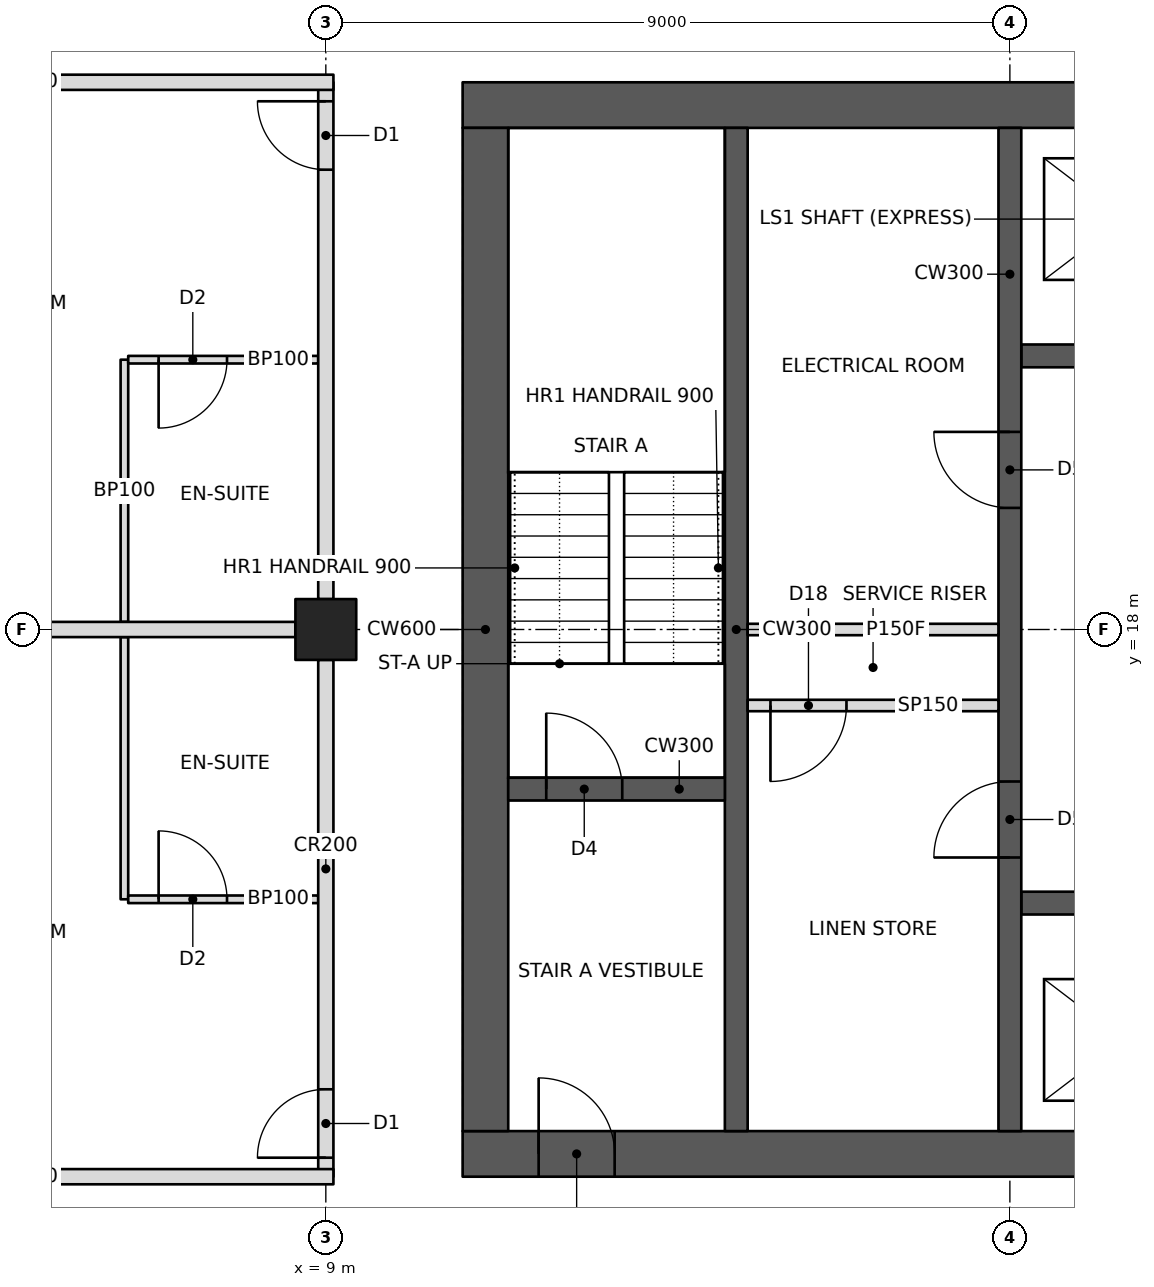
"""IFC4 building model, lengths in metres.
Left out: names, types, materials, properties, quantities, classifications, styles, units other than length and angle.
Written with IfcOpenShell. Run it as: python <this file> out.ifc"""

import sys

from ifc_helpers import new_model, si_unit, direction, frame, frame_2d, origin, origin_2d, place, context, subcontext, project, spatial, rectangle, hollow_rectangle, extrude, element, fill, save


model = new_model("IFC4")
c1 = context("Model", 3, precision=1e-05, world=origin(), true_north=direction((0.0, 1.0)))
c2 = subcontext(c1, "Body", "Model", "MODEL_VIEW")
j1 = project(units=[si_unit("LENGTHUNIT", "METRE"), si_unit("PLANEANGLEUNIT", "RADIAN")], contexts=[c1])
p1 = place(None, origin())
s1 = spatial("IfcSite", under=j1, at=p1, CompositionType="ELEMENT")
p2 = place(p1, origin())
s2 = spatial("IfcBuilding", under=s1, at=p2, CompositionType="ELEMENT")
p3 = place(p2, frame((0.0, 0.0, 28.0)))
s3 = spatial("IfcBuildingStorey", under=s2, at=p3, CompositionType="ELEMENT", Elevation=28.0)
p4 = place(p3, frame((9.0, 18.0, 0.0), z_axis=(0.0, 0.0, 1.0), x_axis=(1.0, 0.0, 0.0)))
e1 = element("IfcColumn", 1, at=p4, inside=s3, PredefinedType="COLUMN", context=c2, shape_type="SweptSolid", body=[
    extrude(hollow_rectangle(XDim=0.8, YDim=0.8, WallThickness=0.1, at=origin_2d()), origin(), (0.0, 0.0, 1.0), 3.4),
])
p5 = place(p3, frame((10.8, 11.1, 0.0), z_axis=(0.0, 0.0, 1.0), x_axis=(1.0, 0.0, 0.0)))
e2 = element("IfcWall", 2, at=p5, inside=s3, PredefinedType="SHEAR", context=c2, shape_type="SweptSolid", body=[
    extrude(rectangle(XDim=23.4, YDim=0.6, at=frame_2d((11.7, 0.0))), origin(), (0.0, 0.0, 1.0), 3.4),
])
p6 = place(p5, frame((1.0, 0.0, 0.0)))
e3 = element("IfcOpeningElement", 3, at=p6, cuts=e2, PredefinedType="OPENING", context=c2, shape_type="SweptSolid", body=[
    extrude(rectangle(XDim=1.0, YDim=2.1, at=frame_2d((0.5, 1.05))), frame((0.0, 0.31, 0.0), z_axis=(0.0, -1.0, 0.0), x_axis=(1.0, 0.0, 0.0)), (0.0, 0.0, 1.0), 0.62),
])
p7 = place(p5, frame((17.2, 0.0, 0.0)))
e4 = element("IfcOpeningElement", 4, at=p7, cuts=e2, PredefinedType="OPENING", context=c2, shape_type="SweptSolid", body=[
    extrude(rectangle(XDim=1.8, YDim=2.1, at=frame_2d((0.9, 1.05))), frame((0.0, 0.31, 0.0), z_axis=(0.0, -1.0, 0.0), x_axis=(1.0, 0.0, 0.0)), (0.0, 0.0, 1.0), 0.62),
])
p8 = place(p3, frame((10.8, 24.9, 0.0), z_axis=(0.0, 0.0, 1.0), x_axis=(1.0, 0.0, 0.0)))
e5 = element("IfcWall", 5, at=p8, inside=s3, PredefinedType="SHEAR", context=c2, shape_type="SweptSolid", body=[
    extrude(rectangle(XDim=23.4, YDim=0.6, at=frame_2d((11.7, 0.0))), origin(), (0.0, 0.0, 1.0), 3.4),
])
p9 = place(p8, frame((17.2, 0.0, 0.0)))
e6 = element("IfcOpeningElement", 6, at=p9, cuts=e5, PredefinedType="OPENING", context=c2, shape_type="SweptSolid", body=[
    extrude(rectangle(XDim=1.8, YDim=2.1, at=frame_2d((0.9, 1.05))), frame((0.0, 0.31, 0.0), z_axis=(0.0, -1.0, 0.0), x_axis=(1.0, 0.0, 0.0)), (0.0, 0.0, 1.0), 0.62),
])
p10 = place(p8, frame((21.1, 0.0, 0.0)))
e7 = element("IfcOpeningElement", 7, at=p10, cuts=e5, PredefinedType="OPENING", context=c2, shape_type="SweptSolid", body=[
    extrude(rectangle(XDim=1.0, YDim=2.1, at=frame_2d((0.5, 1.05))), frame((0.0, 0.31, 0.0), z_axis=(0.0, -1.0, 0.0), x_axis=(1.0, 0.0, 0.0)), (0.0, 0.0, 1.0), 0.62),
])
p11 = place(p3, frame((11.1, 11.4, 0.0), z_axis=(0.0, 0.0, 1.0), x_axis=(0.0, 1.0, 0.0)))
e8 = element("IfcWall", 8, at=p11, inside=s3, PredefinedType="SHEAR", context=c2, shape_type="SweptSolid", body=[
    extrude(rectangle(XDim=13.2, YDim=0.6, at=frame_2d((6.6, 0.0))), origin(), (0.0, 0.0, 1.0), 3.4),
])
p12 = place(p3, frame((14.4, 11.4, 0.0), z_axis=(0.0, 0.0, 1.0), x_axis=(0.0, 1.0, 0.0)))
e9 = element("IfcWall", 9, at=p12, inside=s3, PredefinedType="SHEAR", context=c2, shape_type="SweptSolid", body=[
    extrude(rectangle(XDim=13.2, YDim=0.3, at=frame_2d((6.6, 0.0))), origin(), (0.0, 0.0, 1.0), 3.4),
])
p13 = place(p3, frame((11.4, 15.9, 0.0), z_axis=(0.0, 0.0, 1.0), x_axis=(1.0, 0.0, 0.0)))
e10 = element("IfcWall", 10, at=p13, inside=s3, PredefinedType="SHEAR", context=c2, shape_type="SweptSolid", body=[
    extrude(rectangle(XDim=2.85, YDim=0.3, at=frame_2d((1.425, 0.0))), origin(), (0.0, 0.0, 1.0), 3.4),
])
p14 = place(p13, frame((0.5, 0.0, 0.0)))
e11 = element("IfcOpeningElement", 11, at=p14, cuts=e10, PredefinedType="OPENING", context=c2, shape_type="SweptSolid", body=[
    extrude(rectangle(XDim=1.0, YDim=2.1, at=frame_2d((0.5, 1.05))), frame((0.0, 0.16, 0.0), z_axis=(0.0, -1.0, 0.0), x_axis=(1.0, 0.0, 0.0)), (0.0, 0.0, 1.0), 0.32),
])
p15 = place(p3, frame((18.0, 11.4, 0.0), z_axis=(0.0, 0.0, 1.0), x_axis=(0.0, 1.0, 0.0)))
e12 = element("IfcWall", 12, at=p15, inside=s3, PredefinedType="SHEAR", context=c2, shape_type="SweptSolid", body=[
    extrude(rectangle(XDim=13.2, YDim=0.3, at=frame_2d((6.6, 0.0))), origin(), (0.0, 0.0, 1.0), 3.4),
])
p16 = place(p15, frame((3.6, 0.0, 0.0)))
e13 = element("IfcOpeningElement", 13, at=p16, cuts=e12, PredefinedType="OPENING", context=c2, shape_type="SweptSolid", body=[
    extrude(rectangle(XDim=1.0, YDim=2.1, at=frame_2d((0.5, 1.05))), frame((0.0, 0.16, 0.0), z_axis=(0.0, -1.0, 0.0), x_axis=(1.0, 0.0, 0.0)), (0.0, 0.0, 1.0), 0.32),
])
p17 = place(p15, frame((8.2, 0.0, 0.0)))
e14 = element("IfcOpeningElement", 14, at=p17, cuts=e12, PredefinedType="OPENING", context=c2, shape_type="SweptSolid", body=[
    extrude(rectangle(XDim=1.0, YDim=2.1, at=frame_2d((0.5, 1.05))), frame((0.0, 0.16, 0.0), z_axis=(0.0, -1.0, 0.0), x_axis=(1.0, 0.0, 0.0)), (0.0, 0.0, 1.0), 0.32),
])
p18 = place(p3, frame((14.55, 18.0, 0.0), z_axis=(0.0, 0.0, 1.0), x_axis=(1.0, 0.0, 0.0)))
e15 = element("IfcWall", 15, at=p18, inside=s3, PredefinedType="PARTITIONING", context=c2, shape_type="SweptSolid", body=[
    extrude(rectangle(XDim=3.3, YDim=0.15, at=frame_2d((1.65, 0.0))), origin(), (0.0, 0.0, 1.0), 3.2),
])
p19 = place(p3, frame((18.15, 14.4, 0.0), z_axis=(0.0, 0.0, 1.0), x_axis=(1.0, 0.0, 0.0)))
e16 = element("IfcWall", 16, at=p19, inside=s3, PredefinedType="SHEAR", context=c2, shape_type="SweptSolid", body=[
    extrude(rectangle(XDim=9.0, YDim=0.3, at=frame_2d((4.5, 0.0))), origin(), (0.0, 0.0, 1.0), 3.4),
])
p20 = place(p19, frame((0.8, 0.0, 0.0)))
e17 = element("IfcOpeningElement", 17, at=p20, cuts=e16, PredefinedType="OPENING", context=c2, shape_type="SweptSolid", body=[
    extrude(rectangle(XDim=1.1, YDim=2.1, at=frame_2d((0.55, 1.05))), frame((0.0, 0.16, 0.0), z_axis=(0.0, -1.0, 0.0), x_axis=(1.0, 0.0, 0.0)), (0.0, 0.0, 1.0), 0.32),
])
p21 = place(p19, frame((3.8, 0.0, 0.0)))
e18 = element("IfcOpeningElement", 18, at=p21, cuts=e16, PredefinedType="OPENING", context=c2, shape_type="SweptSolid", body=[
    extrude(rectangle(XDim=1.1, YDim=2.1, at=frame_2d((0.55, 1.05))), frame((0.0, 0.16, 0.0), z_axis=(0.0, -1.0, 0.0), x_axis=(1.0, 0.0, 0.0)), (0.0, 0.0, 1.0), 0.32),
])
p22 = place(p19, frame((6.75, 0.0, 0.0)))
e19 = element("IfcOpeningElement", 19, at=p22, cuts=e16, PredefinedType="OPENING", context=c2, shape_type="SweptSolid", body=[
    extrude(rectangle(XDim=1.2, YDim=2.1, at=frame_2d((0.6, 1.05))), frame((0.0, 0.16, 0.0), z_axis=(0.0, -1.0, 0.0), x_axis=(1.0, 0.0, 0.0)), (0.0, 0.0, 1.0), 0.32),
])
p23 = place(p3, frame((18.15, 21.6, 0.0), z_axis=(0.0, 0.0, 1.0), x_axis=(1.0, 0.0, 0.0)))
e20 = element("IfcWall", 20, at=p23, inside=s3, PredefinedType="SHEAR", context=c2, shape_type="SweptSolid", body=[
    extrude(rectangle(XDim=9.0, YDim=0.3, at=frame_2d((4.5, 0.0))), origin(), (0.0, 0.0, 1.0), 3.4),
])
p24 = place(p23, frame((6.75, 0.0, 0.0)))
e21 = element("IfcOpeningElement", 21, at=p24, cuts=e20, PredefinedType="OPENING", context=c2, shape_type="SweptSolid", body=[
    extrude(rectangle(XDim=1.2, YDim=2.1, at=frame_2d((0.6, 1.05))), frame((0.0, 0.16, 0.0), z_axis=(0.0, -1.0, 0.0), x_axis=(1.0, 0.0, 0.0)), (0.0, 0.0, 1.0), 0.32),
])
p25 = place(p3, frame((9.0, 10.8, 0.0), z_axis=(0.0, 0.0, 1.0), x_axis=(0.0, 1.0, 0.0)))
e22 = element("IfcWall", 22, at=p25, inside=s3, PredefinedType="PARTITIONING", context=c2, shape_type="SweptSolid", body=[
    extrude(rectangle(XDim=6.8, YDim=0.2, at=frame_2d((3.4, 0.0))), origin(), (0.0, 0.0, 1.0), 2.405),
])
p26 = place(p25, frame((0.25, 0.0, 0.0)))
e23 = element("IfcOpeningElement", 23, at=p26, cuts=e22, PredefinedType="OPENING", context=c2, shape_type="SweptSolid", body=[
    extrude(rectangle(XDim=0.9, YDim=2.1, at=frame_2d((0.45, 1.05))), frame((0.0, 0.11, 0.0), z_axis=(0.0, -1.0, 0.0), x_axis=(1.0, 0.0, 0.0)), (0.0, 0.0, 1.0), 0.22),
])
p27 = place(p3, frame((9.0, 18.4, 0.0), z_axis=(0.0, 0.0, 1.0), x_axis=(0.0, 1.0, 0.0)))
e24 = element("IfcWall", 24, at=p27, inside=s3, PredefinedType="PARTITIONING", context=c2, shape_type="SweptSolid", body=[
    extrude(rectangle(XDim=6.8, YDim=0.2, at=frame_2d((3.4, 0.0))), origin(), (0.0, 0.0, 1.0), 2.405),
])
p28 = place(p27, frame((5.65, 0.0, 0.0)))
e25 = element("IfcOpeningElement", 25, at=p28, cuts=e24, PredefinedType="OPENING", context=c2, shape_type="SweptSolid", body=[
    extrude(rectangle(XDim=0.9, YDim=2.1, at=frame_2d((0.45, 1.05))), frame((0.0, 0.11, 0.0), z_axis=(0.0, -1.0, 0.0), x_axis=(1.0, 0.0, 0.0)), (0.0, 0.0, 1.0), 0.22),
])
for number, where, z_axis, x_axis in (
    (26, (1.0, 10.8, 0.0), (0.0, 0.0, 1.0), (1.0, 0.0, 0.0)),
    (27, (1.0, 25.2, 0.0), (0.0, 0.0, 1.0), (1.0, 0.0, 0.0)),
):
    element("IfcWall", number, at=place(p3, frame(where, z_axis=z_axis, x_axis=x_axis)), inside=s3, PredefinedType="PARTITIONING", context=c2, shape_type="SweptSolid", body=[
        extrude(rectangle(XDim=8.1, YDim=0.2, at=frame_2d((4.05, 0.0))), origin(), (0.0, 0.0, 1.0), 2.404),
    ])
p29 = place(p3, frame((8.6, 18.0, 0.0), z_axis=(0.0, 0.0, 1.0), x_axis=(-1.0, 0.0, 0.0)))
e28 = element("IfcWall", 28, at=p29, inside=s3, PredefinedType="PARTITIONING", context=c2, shape_type="SweptSolid", body=[
    extrude(rectangle(XDim=7.6, YDim=0.2, at=frame_2d((3.8, 0.0))), origin(), (0.0, 0.0, 1.0), 2.405),
])
p30 = place(p3, frame((6.35, 14.45, 0.0), z_axis=(0.0, 0.0, 1.0), x_axis=(0.0, 1.0, 0.0)))
e29 = element("IfcWall", 29, at=p30, inside=s3, PredefinedType="PARTITIONING", context=c2, shape_type="SweptSolid", body=[
    extrude(rectangle(XDim=3.45, YDim=0.1, at=frame_2d((1.725, 0.0))), origin(), (0.0, 0.0, 1.0), 2.404),
])
p31 = place(p3, frame((8.9, 14.45, 0.0), z_axis=(0.0, 0.0, 1.0), x_axis=(-1.0, 0.0, 0.0)))
e30 = element("IfcWall", 30, at=p31, inside=s3, PredefinedType="PARTITIONING", context=c2, shape_type="SweptSolid", body=[
    extrude(rectangle(XDim=2.5, YDim=0.1, at=frame_2d((1.25, 0.0))), origin(), (0.0, 0.0, 1.0), 2.404),
])
p32 = place(p31, frame((1.2, 0.0, 0.0)))
e31 = element("IfcOpeningElement", 31, at=p32, cuts=e30, PredefinedType="OPENING", context=c2, shape_type="SweptSolid", body=[
    extrude(rectangle(XDim=0.9, YDim=2.1, at=frame_2d((0.45, 1.05))), frame((0.0, 0.06, 0.0), z_axis=(0.0, -1.0, 0.0), x_axis=(1.0, 0.0, 0.0)), (0.0, 0.0, 1.0), 0.12),
])
p33 = place(p3, frame((6.35, 18.1, 0.0), z_axis=(0.0, 0.0, 1.0), x_axis=(0.0, 1.0, 0.0)))
e32 = element("IfcWall", 32, at=p33, inside=s3, PredefinedType="PARTITIONING", context=c2, shape_type="SweptSolid", body=[
    extrude(rectangle(XDim=3.45, YDim=0.1, at=frame_2d((1.725, 0.0))), origin(), (0.0, 0.0, 1.0), 2.404),
])
p34 = place(p3, frame((8.9, 21.55, 0.0), z_axis=(0.0, 0.0, 1.0), x_axis=(-1.0, 0.0, 0.0)))
e33 = element("IfcWall", 33, at=p34, inside=s3, PredefinedType="PARTITIONING", context=c2, shape_type="SweptSolid", body=[
    extrude(rectangle(XDim=2.5, YDim=0.1, at=frame_2d((1.25, 0.0))), origin(), (0.0, 0.0, 1.0), 2.404),
])
p35 = place(p34, frame((1.2, 0.0, 0.0)))
e34 = element("IfcOpeningElement", 34, at=p35, cuts=e33, PredefinedType="OPENING", context=c2, shape_type="SweptSolid", body=[
    extrude(rectangle(XDim=0.9, YDim=2.1, at=frame_2d((0.45, 1.05))), frame((0.0, 0.06, 0.0), z_axis=(0.0, -1.0, 0.0), x_axis=(1.0, 0.0, 0.0)), (0.0, 0.0, 1.0), 0.12),
])
p36 = place(p3, frame((14.55, 17.0, 0.0), z_axis=(0.0, 0.0, 1.0), x_axis=(1.0, 0.0, 0.0)))
e35 = element("IfcWall", 35, at=p36, inside=s3, PredefinedType="PARTITIONING", context=c2, shape_type="SweptSolid", body=[
    extrude(rectangle(XDim=3.3, YDim=0.15, at=frame_2d((1.65, 0.0))), origin(), (0.0, 0.0, 1.0), 3.2),
])
p37 = place(p36, frame((0.3, 0.0, 0.0)))
e36 = element("IfcOpeningElement", 36, at=p37, cuts=e35, PredefinedType="OPENING", context=c2, shape_type="SweptSolid", body=[
    extrude(rectangle(XDim=1.0, YDim=2.1, at=frame_2d((0.5, 1.05))), frame((0.0, 0.085, 0.0), z_axis=(0.0, -1.0, 0.0), x_axis=(1.0, 0.0, 0.0)), (0.0, 0.0, 1.0), 0.17),
])
p38 = place(p32, frame((0.9, 0.0, 0.0), z_axis=(0.0, 0.0, 1.0), x_axis=(-1.0, 0.0, 0.0)))
e37 = element("IfcDoor", 37, at=p38, inside=s3, OperationType="SINGLE_SWING_LEFT", PredefinedType="DOOR", context=c2, shape_type="SweptSolid", body=[
    extrude(rectangle(XDim=0.9, YDim=2.1, at=frame_2d((0.45, 1.05))), frame((0.0, 0.025, 0.0), z_axis=(0.0, -1.0, 0.0), x_axis=(1.0, 0.0, 0.0)), (0.0, 0.0, 1.0), 0.05),
])
fill(e31, e37)
p39 = place(p26, origin())
e38 = element("IfcDoor", 38, at=p39, inside=s3, OperationType="SINGLE_SWING_LEFT", PredefinedType="DOOR", context=c2, shape_type="SweptSolid", body=[
    extrude(rectangle(XDim=0.9, YDim=2.1, at=frame_2d((0.45, 1.05))), frame((0.0, 0.025, 0.0), z_axis=(0.0, -1.0, 0.0), x_axis=(1.0, 0.0, 0.0)), (0.0, 0.0, 1.0), 0.05),
])
fill(e23, e38)
p40 = place(p35, origin())
e39 = element("IfcDoor", 39, at=p40, inside=s3, OperationType="SINGLE_SWING_RIGHT", PredefinedType="DOOR", context=c2, shape_type="SweptSolid", body=[
    extrude(rectangle(XDim=0.9, YDim=2.1, at=frame_2d((0.45, 1.05))), frame((0.0, 0.025, 0.0), z_axis=(0.0, -1.0, 0.0), x_axis=(1.0, 0.0, 0.0)), (0.0, 0.0, 1.0), 0.05),
])
fill(e34, e39)
p41 = place(p28, origin())
e40 = element("IfcDoor", 40, at=p41, inside=s3, OperationType="SINGLE_SWING_RIGHT", PredefinedType="DOOR", context=c2, shape_type="SweptSolid", body=[
    extrude(rectangle(XDim=0.9, YDim=2.1, at=frame_2d((0.45, 1.05))), frame((0.0, 0.025, 0.0), z_axis=(0.0, -1.0, 0.0), x_axis=(1.0, 0.0, 0.0)), (0.0, 0.0, 1.0), 0.05),
])
fill(e25, e40)
p42 = place(p37, frame((1.0, 0.0, 0.0), z_axis=(0.0, 0.0, 1.0), x_axis=(-1.0, 0.0, 0.0)))
e41 = element("IfcDoor", 41, at=p42, inside=s3, OperationType="SINGLE_SWING_RIGHT", PredefinedType="DOOR", context=c2, shape_type="SweptSolid", body=[
    extrude(rectangle(XDim=1.0, YDim=2.1, at=frame_2d((0.5, 1.05))), frame((0.0, 0.025, 0.0), z_axis=(0.0, -1.0, 0.0), x_axis=(1.0, 0.0, 0.0)), (0.0, 0.0, 1.0), 0.05),
])
fill(e36, e41)
p43 = place(p6, origin())
e42 = element("IfcDoor", 42, at=p43, inside=s3, OperationType="SINGLE_SWING_LEFT", PredefinedType="DOOR", context=c2, shape_type="SweptSolid", body=[
    extrude(rectangle(XDim=1.0, YDim=2.1, at=frame_2d((0.5, 1.05))), frame((0.0, 0.025, 0.0), z_axis=(0.0, -1.0, 0.0), x_axis=(1.0, 0.0, 0.0)), (0.0, 0.0, 1.0), 0.05),
])
fill(e3, e42)
p44 = place(p14, origin())
e43 = element("IfcDoor", 43, at=p44, inside=s3, OperationType="SINGLE_SWING_LEFT", PredefinedType="DOOR", context=c2, shape_type="SweptSolid", body=[
    extrude(rectangle(XDim=1.0, YDim=2.1, at=frame_2d((0.5, 1.05))), frame((0.0, 0.025, 0.0), z_axis=(0.0, -1.0, 0.0), x_axis=(1.0, 0.0, 0.0)), (0.0, 0.0, 1.0), 0.05),
])
fill(e11, e43)
p45 = place(p16, origin())
e44 = element("IfcDoor", 44, at=p45, inside=s3, OperationType="SINGLE_SWING_LEFT", PredefinedType="DOOR", context=c2, shape_type="SweptSolid", body=[
    extrude(rectangle(XDim=1.0, YDim=2.1, at=frame_2d((0.5, 1.05))), frame((0.0, 0.025, 0.0), z_axis=(0.0, -1.0, 0.0), x_axis=(1.0, 0.0, 0.0)), (0.0, 0.0, 1.0), 0.05),
])
fill(e13, e44)
p46 = place(p17, origin())
e45 = element("IfcDoor", 45, at=p46, inside=s3, OperationType="SINGLE_SWING_RIGHT", PredefinedType="DOOR", context=c2, shape_type="SweptSolid", body=[
    extrude(rectangle(XDim=1.0, YDim=2.1, at=frame_2d((0.5, 1.05))), frame((0.0, 0.025, 0.0), z_axis=(0.0, -1.0, 0.0), x_axis=(1.0, 0.0, 0.0)), (0.0, 0.0, 1.0), 0.05),
])
fill(e14, e45)
save(model, sys.argv[1])
